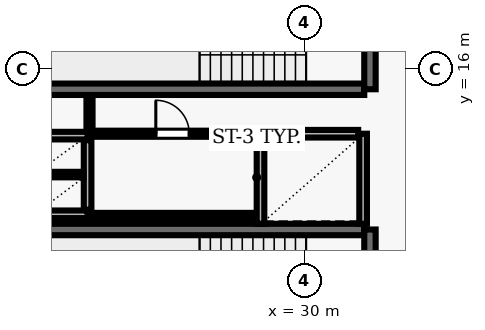
"""IFC4 building model, lengths in metres.
Left out: names, types, materials, properties, quantities, classifications, styles, units other than length and angle.
Written with IfcOpenShell. Run it as: python <this file> out.ifc"""

import sys

from ifc_helpers import new_model, si_unit, direction, frame, frame_2d, origin, place, context, subcontext, project, spatial, rectangle, extrude, element, fill, save


model = new_model("IFC4")
c1 = context("Model", 3, precision=1e-05, world=origin(), true_north=direction((0.0, 1.0)))
c2 = subcontext(c1, "Body", "Model", "MODEL_VIEW")
j1 = project(units=[si_unit("LENGTHUNIT", "METRE"), si_unit("PLANEANGLEUNIT", "RADIAN")], contexts=[c1])
p1 = place(None, origin())
s1 = spatial("IfcSite", under=j1, at=p1, CompositionType="ELEMENT")
p2 = place(p1, origin())
s2 = spatial("IfcBuilding", under=s1, at=p2, CompositionType="ELEMENT")
p3 = place(p2, frame((0.0, 0.0, 111.2)))
s3 = spatial("IfcBuildingStorey", under=s2, at=p3, CompositionType="ELEMENT", Elevation=111.2)
p4 = place(p3, frame((23.22, 15.47, 0.0), z_axis=(0.0, 0.0, 1.0), x_axis=(1.0, 0.0, 0.0)))
e1 = element("IfcWall", 1, at=p4, inside=s3, PredefinedType="SHEAR", context=c2, shape_type="SweptSolid", body=[
    extrude(rectangle(XDim=8.36, YDim=0.3, at=frame_2d((4.18, 0.0))), origin(), (0.0, 0.0, 1.0), 3.69),
])
p5 = place(p3, frame((31.73, 15.47, 0.0), z_axis=(0.0, 0.0, 1.0), x_axis=(0.0, 1.0, 0.0)))
e2 = element("IfcWall", 2, at=p5, inside=s3, PredefinedType="SHEAR", context=c2, shape_type="SweptSolid", body=[
    extrude(rectangle(XDim=3.51, YDim=0.3, at=frame_2d((1.755, 0.0))), origin(), (0.0, 0.0, 1.0), 3.69),
])
p6 = place(p5, frame((1.18, 0.0, 0.0)))
e3 = element("IfcOpeningElement", 3, at=p6, cuts=e2, PredefinedType="OPENING", context=c2, shape_type="SweptSolid", body=[
    extrude(rectangle(XDim=1.15, YDim=2.15, at=frame_2d((0.575, 1.075))), frame((0.0, 0.16, 0.0), z_axis=(0.0, -1.0, 0.0), x_axis=(1.0, 0.0, 0.0)), (0.0, 0.0, 1.0), 0.32),
])
p7 = place(p3, frame((31.58, 11.78, 0.0), z_axis=(0.0, 0.0, 1.0), x_axis=(-1.0, 0.0, 0.0)))
e4 = element("IfcWall", 4, at=p7, inside=s3, PredefinedType="SHEAR", context=c2, shape_type="SweptSolid", body=[
    extrude(rectangle(XDim=8.36, YDim=0.3, at=frame_2d((4.18, 0.0))), origin(), (0.0, 0.0, 1.0), 3.69),
])
p8 = place(p3, frame((31.73, 8.27, 0.0), z_axis=(0.0, 0.0, 1.0), x_axis=(0.0, 1.0, 0.0)))
e5 = element("IfcWall", 5, at=p8, inside=s3, PredefinedType="SHEAR", context=c2, shape_type="SweptSolid", body=[
    extrude(rectangle(XDim=3.51, YDim=0.3, at=frame_2d((1.755, 0.0))), origin(), (0.0, 0.0, 1.0), 3.69),
])
p9 = place(p8, frame((1.18, 0.0, 0.0)))
e6 = element("IfcOpeningElement", 6, at=p9, cuts=e5, PredefinedType="OPENING", context=c2, shape_type="SweptSolid", body=[
    extrude(rectangle(XDim=1.15, YDim=2.15, at=frame_2d((0.575, 1.075))), frame((0.0, 0.16, 0.0), z_axis=(0.0, -1.0, 0.0), x_axis=(1.0, 0.0, 0.0)), (0.0, 0.0, 1.0), 0.32),
])
for number, where, z_axis, x_axis in (
    (7, (28.85, 14.3, 0.0), (0.0, 0.0, 1.0), (0.0, -1.0, 0.0)),
    (8, (31.55, 11.93, 0.0), (0.0, 0.0, 1.0), (0.0, 1.0, 0.0)),
):
    element("IfcWall", number, at=place(p3, frame(where, z_axis=z_axis, x_axis=x_axis)), inside=s3, PredefinedType="SOLIDWALL", context=c2, shape_type="SweptSolid", body=[
        extrude(rectangle(XDim=2.37, YDim=0.2, at=frame_2d((1.185, 0.0))), origin(), (0.0, 0.0, 1.0), 3.69),
    ])
p10 = place(p3, frame((31.42, 14.3, 0.0), z_axis=(0.0, 0.0, 1.0), x_axis=(-1.0, 0.0, 0.0)))
e9 = element("IfcWall", 9, at=p10, inside=s3, PredefinedType="SOLIDWALL", context=c2, shape_type="SweptSolid", body=[
    extrude(rectangle(XDim=2.44, YDim=0.2, at=frame_2d((1.22, 0.0))), origin(), (0.0, 0.0, 1.0), 3.69),
])
for number, where, z_axis, x_axis in (
    (10, (22.9, 14.25, 0.0), (0.0, 0.0, 1.0), (1.0, 0.0, 0.0)),
    (11, (22.9, 12.18, 0.0), (0.0, 0.0, 1.0), (1.0, 0.0, 0.0)),
):
    element("IfcWall", number, at=place(p3, frame(where, z_axis=z_axis, x_axis=x_axis)), inside=s3, PredefinedType="SOLIDWALL", context=c2, shape_type="SweptSolid", body=[
        extrude(rectangle(XDim=1.4, YDim=0.2, at=frame_2d((0.7, 0.0))), origin(), (0.0, 0.0, 1.0), 3.69),
    ])
p11 = place(p3, frame((24.3, 12.3, 0.0), z_axis=(0.0, 0.0, 1.0), x_axis=(0.0, 1.0, 0.0)))
e12 = element("IfcWall", 12, at=p11, inside=s3, PredefinedType="SOLIDWALL", context=c2, shape_type="SweptSolid", body=[
    extrude(rectangle(XDim=1.83, YDim=0.2, at=frame_2d((0.915, 0.0))), origin(), (0.0, 0.0, 1.0), 3.69),
])
p12 = place(p3, frame((23.01, 13.225, 0.0), z_axis=(0.0, 0.0, 1.0), x_axis=(1.0, 0.0, 0.0)))
e13 = element("IfcWall", 13, at=p12, inside=s3, PredefinedType="PARTITIONING", context=c2, shape_type="SweptSolid", body=[
    extrude(rectangle(XDim=1.18, YDim=0.145, at=frame_2d((0.59, 0.0))), origin(), (0.0, 0.0, 1.0), 3.69),
])
p13 = place(p3, frame((24.35, 12.15, 0.0), z_axis=(0.0, 0.0, 1.0), x_axis=(1.0, 0.0, 0.0)))
e14 = element("IfcWall", 14, at=p13, inside=s3, PredefinedType="PARTITIONING", context=c2, shape_type="SweptSolid", body=[
    extrude(rectangle(XDim=4.37, YDim=0.135, at=frame_2d((2.185, 0.0))), origin(), (0.0, 0.0, 1.0), 3.69),
])
p14 = place(p3, frame((24.35, 14.3, 0.0), z_axis=(0.0, 0.0, 1.0), x_axis=(1.0, 0.0, 0.0)))
e15 = element("IfcWall", 15, at=p14, inside=s3, PredefinedType="PARTITIONING", context=c2, shape_type="SweptSolid", body=[
    extrude(rectangle(XDim=4.37, YDim=0.16, at=frame_2d((2.185, 0.0))), origin(), (0.0, 0.0, 1.0), 3.69),
])
p15 = place(p14, frame((1.745, 0.0, 0.0)))
e16 = element("IfcOpeningElement", 16, at=p15, cuts=e15, PredefinedType="OPENING", context=c2, shape_type="SweptSolid", body=[
    extrude(rectangle(XDim=0.88, YDim=2.1, at=frame_2d((0.44, 1.05))), frame((0.0, 0.09, 0.0), z_axis=(0.0, -1.0, 0.0), x_axis=(1.0, 0.0, 0.0)), (0.0, 0.0, 1.0), 0.18),
])
p16 = place(p3, frame((24.35, 15.29, 0.0), z_axis=(0.0, 0.0, 1.0), x_axis=(0.0, -1.0, 0.0)))
e17 = element("IfcWall", 17, at=p16, inside=s3, PredefinedType="PARTITIONING", context=c2, shape_type="SweptSolid", body=[
    extrude(rectangle(XDim=0.915, YDim=0.16, at=frame_2d((0.458, 0.0))), origin(), (0.0, 0.0, 1.0), 3.69),
])
p17 = place(p15, origin())
e18 = element("IfcDoor", 18, at=p17, inside=s3, OperationType="SINGLE_SWING_LEFT", PredefinedType="DOOR", context=c2, shape_type="SweptSolid", body=[
    extrude(rectangle(XDim=0.88, YDim=2.1, at=frame_2d((0.44, 1.05))), frame((0.0, 0.025, 0.0), z_axis=(0.0, -1.0, 0.0), x_axis=(1.0, 0.0, 0.0)), (0.0, 0.0, 1.0), 0.05),
])
fill(e16, e18)
save(model, sys.argv[1])
